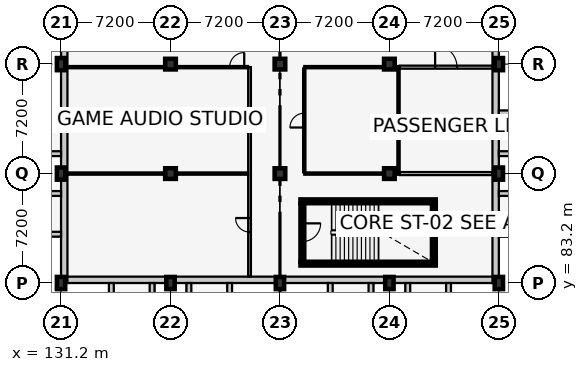
"""IFC4 building model, lengths in metres.
Left out: names, types, materials, properties, quantities, classifications, styles, units other than length and angle.
Written with IfcOpenShell. Run it as: python <this file> out.ifc"""

import sys

from ifc_helpers import new_model, si_unit, direction, frame, frame_2d, origin, origin_2d, place, context, subcontext, project, spatial, rectangle, extrude, element, fill, save


model = new_model("IFC4")
c1 = context("Model", 3, precision=1e-05, world=origin(), true_north=direction((0.0, 1.0)))
c2 = subcontext(c1, "Body", "Model", "MODEL_VIEW")
j1 = project(units=[si_unit("LENGTHUNIT", "METRE"), si_unit("PLANEANGLEUNIT", "RADIAN")], contexts=[c1])
p1 = place(None, origin())
s1 = spatial("IfcSite", under=j1, at=p1, CompositionType="ELEMENT")
p2 = place(p1, origin())
s2 = spatial("IfcBuilding", under=s1, at=p2, CompositionType="ELEMENT")
p3 = place(p2, frame((0.0, 0.0, 18.0)))
s3 = spatial("IfcBuildingStorey", under=s2, at=p3, CompositionType="ELEMENT", Elevation=18.0)
for number, where, z_axis, x_axis in (
    (1, (131.2, 83.2, 0.0), (0.0, 0.0, 1.0), (1.0, 0.0, 0.0)),
    (2, (131.2, 90.4, 0.0), (0.0, 0.0, 1.0), (1.0, 0.0, 0.0)),
    (3, (131.2, 97.6, 0.0), (0.0, 0.0, 1.0), (1.0, 0.0, 0.0)),
    (4, (138.4, 83.2, 0.0), (0.0, 0.0, 1.0), (1.0, 0.0, 0.0)),
):
    element("IfcColumn", number, at=place(p3, frame(where, z_axis=z_axis, x_axis=x_axis)), inside=s3, PredefinedType="COLUMN", context=c2, shape_type="SweptSolid", body=[
        extrude(rectangle(XDim=0.55, YDim=0.8, at=origin_2d()), origin(), (0.0, 0.0, 1.0), 3.9),
    ])
for number, where, z_axis, x_axis in (
    (5, (138.4, 90.4, 0.0), (0.0, 0.0, 1.0), (1.0, 0.0, 0.0)),
    (6, (138.4, 97.6, 0.0), (0.0, 0.0, 1.0), (1.0, 0.0, 0.0)),
):
    element("IfcColumn", number, at=place(p3, frame(where, z_axis=z_axis, x_axis=x_axis)), inside=s3, PredefinedType="COLUMN", context=c2, shape_type="SweptSolid", body=[
        extrude(rectangle(XDim=0.7, YDim=0.7, at=origin_2d()), origin(), (0.0, 0.0, 1.0), 3.9),
    ])
p4 = place(p3, frame((145.6, 83.2, 0.0), z_axis=(0.0, 0.0, 1.0), x_axis=(1.0, 0.0, 0.0)))
e7 = element("IfcColumn", 7, at=p4, inside=s3, PredefinedType="COLUMN", context=c2, shape_type="SweptSolid", body=[
    extrude(rectangle(XDim=0.55, YDim=0.8, at=origin_2d()), origin(), (0.0, 0.0, 1.0), 3.9),
])
for number, where, z_axis, x_axis in (
    (8, (145.6, 90.4, 0.0), (0.0, 0.0, 1.0), (1.0, 0.0, 0.0)),
    (9, (145.6, 97.6, 0.0), (0.0, 0.0, 1.0), (1.0, 0.0, 0.0)),
):
    element("IfcColumn", number, at=place(p3, frame(where, z_axis=z_axis, x_axis=x_axis)), inside=s3, PredefinedType="COLUMN", context=c2, shape_type="SweptSolid", body=[
        extrude(rectangle(XDim=0.7, YDim=0.7, at=origin_2d()), origin(), (0.0, 0.0, 1.0), 3.9),
    ])
p5 = place(p3, frame((152.8, 83.2, 0.0), z_axis=(0.0, 0.0, 1.0), x_axis=(1.0, 0.0, 0.0)))
e10 = element("IfcColumn", 10, at=p5, inside=s3, PredefinedType="COLUMN", context=c2, shape_type="SweptSolid", body=[
    extrude(rectangle(XDim=0.55, YDim=0.8, at=origin_2d()), origin(), (0.0, 0.0, 1.0), 3.9),
])
for number, where, z_axis, x_axis in (
    (11, (152.8, 90.4, 0.0), (0.0, 0.0, 1.0), (1.0, 0.0, 0.0)),
    (12, (152.8, 97.6, 0.0), (0.0, 0.0, 1.0), (1.0, 0.0, 0.0)),
):
    element("IfcColumn", number, at=place(p3, frame(where, z_axis=z_axis, x_axis=x_axis)), inside=s3, PredefinedType="COLUMN", context=c2, shape_type="SweptSolid", body=[
        extrude(rectangle(XDim=0.7, YDim=0.7, at=origin_2d()), origin(), (0.0, 0.0, 1.0), 3.9),
    ])
for number, where, z_axis, x_axis in (
    (13, (160.0, 83.2, 0.0), (0.0, 0.0, 1.0), (1.0, 0.0, 0.0)),
    (14, (160.0, 90.4, 0.0), (0.0, 0.0, 1.0), (1.0, 0.0, 0.0)),
    (15, (160.0, 97.6, 0.0), (0.0, 0.0, 1.0), (1.0, 0.0, 0.0)),
):
    element("IfcColumn", number, at=place(p3, frame(where, z_axis=z_axis, x_axis=x_axis)), inside=s3, PredefinedType="COLUMN", context=c2, shape_type="SweptSolid", body=[
        extrude(rectangle(XDim=0.55, YDim=0.8, at=origin_2d()), origin(), (0.0, 0.0, 1.0), 3.9),
    ])
p6 = place(p3, frame((160.0, 83.41, 0.0), z_axis=(0.0, 0.0, 1.0), x_axis=(-1.0, 0.0, 0.0)))
e16 = element("IfcWall", 16, at=p6, inside=s3, PredefinedType="SOLIDWALL", context=c2, shape_type="SweptSolid", body=[
    extrude(rectangle(XDim=28.8, YDim=0.42, at=frame_2d((14.4, 0.0))), origin(), (0.0, 0.0, 1.0), 2.955),
])
p7 = place(p3, frame((134.51, 83.2, 0.0), z_axis=(0.0, 0.0, 1.0), x_axis=(0.0, -1.0, 0.0)))
e17 = element("IfcWall", 17, at=p7, inside=s3, PredefinedType="SOLIDWALL", context=c2, shape_type="SweptSolid", body=[
    extrude(rectangle(XDim=1.35, YDim=0.32, at=frame_2d((0.675, 0.0))), origin(), (0.0, 0.0, 1.0), 3.64),
])
for number, where, z_axis, x_axis in (
    (18, (137.19, 83.2, 0.0), (0.0, 0.0, 1.0), (0.0, -1.0, 0.0)),
    (19, (139.61, 83.2, 0.0), (0.0, 0.0, 1.0), (0.0, -1.0, 0.0)),
):
    element("IfcWall", number, at=place(p3, frame(where, z_axis=z_axis, x_axis=x_axis)), inside=s3, PredefinedType="SOLIDWALL", context=c2, shape_type="SweptSolid", body=[
        extrude(rectangle(XDim=1.793, YDim=0.32, at=frame_2d((0.896, 0.0))), origin(), (0.0, 0.0, 1.0), 3.64),
    ])
for number, where, z_axis, x_axis in (
    (20, (142.29, 83.2, 0.0), (0.0, 0.0, 1.0), (0.0, -1.0, 0.0)),
    (21, (148.91, 83.2, 0.0), (0.0, 0.0, 1.0), (0.0, -1.0, 0.0)),
):
    element("IfcWall", number, at=place(p3, frame(where, z_axis=z_axis, x_axis=x_axis)), inside=s3, PredefinedType="SOLIDWALL", context=c2, shape_type="SweptSolid", body=[
        extrude(rectangle(XDim=1.35, YDim=0.32, at=frame_2d((0.675, 0.0))), origin(), (0.0, 0.0, 1.0), 3.64),
    ])
for number, where, z_axis, x_axis in (
    (22, (151.59, 83.2, 0.0), (0.0, 0.0, 1.0), (0.0, -1.0, 0.0)),
    (23, (154.01, 83.2, 0.0), (0.0, 0.0, 1.0), (0.0, -1.0, 0.0)),
):
    element("IfcWall", number, at=place(p3, frame(where, z_axis=z_axis, x_axis=x_axis)), inside=s3, PredefinedType="SOLIDWALL", context=c2, shape_type="SweptSolid", body=[
        extrude(rectangle(XDim=1.793, YDim=0.32, at=frame_2d((0.896, 0.0))), origin(), (0.0, 0.0, 1.0), 3.64),
    ])
p8 = place(p3, frame((156.69, 83.2, 0.0), z_axis=(0.0, 0.0, 1.0), x_axis=(0.0, -1.0, 0.0)))
e24 = element("IfcWall", 24, at=p8, inside=s3, PredefinedType="SOLIDWALL", context=c2, shape_type="SweptSolid", body=[
    extrude(rectangle(XDim=1.35, YDim=0.32, at=frame_2d((0.675, 0.0))), origin(), (0.0, 0.0, 1.0), 3.64),
])
p9 = place(p3, frame((159.79, 112.0, 0.0), z_axis=(0.0, 0.0, 1.0), x_axis=(0.0, -1.0, 0.0)))
e25 = element("IfcWall", 25, at=p9, inside=s3, PredefinedType="SOLIDWALL", context=c2, shape_type="SweptSolid", body=[
    extrude(rectangle(XDim=28.8, YDim=0.42, at=frame_2d((14.4, 0.0))), origin(), (0.0, 0.0, 1.0), 3.055),
])
p10 = place(p3, frame((160.0, 86.41, 0.0), z_axis=(0.0, 0.0, 1.0), x_axis=(1.0, 0.0, 0.0)))
e26 = element("IfcWall", 26, at=p10, inside=s3, PredefinedType="SOLIDWALL", context=c2, shape_type="SweptSolid", body=[
    extrude(rectangle(XDim=1.793, YDim=0.32, at=frame_2d((0.896, 0.0))), origin(), (0.0, 0.0, 1.0), 3.64),
])
for number, where, z_axis, x_axis in (
    (27, (160.0, 89.09, 0.0), (0.0, 0.0, 1.0), (1.0, 0.0, 0.0)),
    (28, (160.0, 91.71, 0.0), (0.0, 0.0, 1.0), (1.0, 0.0, 0.0)),
):
    element("IfcWall", number, at=place(p3, frame(where, z_axis=z_axis, x_axis=x_axis)), inside=s3, PredefinedType="SOLIDWALL", context=c2, shape_type="SweptSolid", body=[
        extrude(rectangle(XDim=1.35, YDim=0.32, at=frame_2d((0.675, 0.0))), origin(), (0.0, 0.0, 1.0), 3.64),
    ])
p11 = place(p3, frame((160.0, 94.39, 0.0), z_axis=(0.0, 0.0, 1.0), x_axis=(1.0, 0.0, 0.0)))
e29 = element("IfcWall", 29, at=p11, inside=s3, PredefinedType="SOLIDWALL", context=c2, shape_type="SweptSolid", body=[
    extrude(rectangle(XDim=1.793, YDim=0.32, at=frame_2d((0.896, 0.0))), origin(), (0.0, 0.0, 1.0), 3.64),
])
p12 = place(p3, frame((131.41, 83.2, 0.0), z_axis=(0.0, 0.0, 1.0), x_axis=(0.0, 1.0, 0.0)))
e30 = element("IfcWall", 30, at=p12, inside=s3, PredefinedType="SOLIDWALL", context=c2, shape_type="SweptSolid", body=[
    extrude(rectangle(XDim=28.8, YDim=0.42, at=frame_2d((14.4, 0.0))), origin(), (0.0, 0.0, 1.0), 3.055),
])
p13 = place(p3, frame((131.2, 86.41, 0.0), z_axis=(0.0, 0.0, 1.0), x_axis=(-1.0, 0.0, 0.0)))
e31 = element("IfcWall", 31, at=p13, inside=s3, PredefinedType="SOLIDWALL", context=c2, shape_type="SweptSolid", body=[
    extrude(rectangle(XDim=1.35, YDim=0.32, at=frame_2d((0.675, 0.0))), origin(), (0.0, 0.0, 1.0), 3.64),
])
for number, where, z_axis, x_axis in (
    (32, (131.2, 89.09, 0.0), (0.0, 0.0, 1.0), (-1.0, 0.0, 0.0)),
    (33, (131.2, 91.71, 0.0), (0.0, 0.0, 1.0), (-1.0, 0.0, 0.0)),
):
    element("IfcWall", number, at=place(p3, frame(where, z_axis=z_axis, x_axis=x_axis)), inside=s3, PredefinedType="SOLIDWALL", context=c2, shape_type="SweptSolid", body=[
        extrude(rectangle(XDim=1.793, YDim=0.32, at=frame_2d((0.896, 0.0))), origin(), (0.0, 0.0, 1.0), 3.64),
    ])
p14 = place(p3, frame((131.2, 94.39, 0.0), z_axis=(0.0, 0.0, 1.0), x_axis=(-1.0, 0.0, 0.0)))
e34 = element("IfcWall", 34, at=p14, inside=s3, PredefinedType="SOLIDWALL", context=c2, shape_type="SweptSolid", body=[
    extrude(rectangle(XDim=1.35, YDim=0.32, at=frame_2d((0.675, 0.0))), origin(), (0.0, 0.0, 1.0), 3.64),
])
for number, where, z_axis, x_axis in (
    (35, (146.95, 84.475, 0.0), (0.0, 0.0, 1.0), (1.0, 0.0, 0.0)),
    (36, (155.85, 88.575, 0.0), (0.0, 0.0, 1.0), (-1.0, 0.0, 0.0)),
):
    element("IfcWall", number, at=place(p3, frame(where, z_axis=z_axis, x_axis=x_axis)), inside=s3, PredefinedType="SHEAR", context=c2, shape_type="SweptSolid", body=[
        extrude(rectangle(XDim=8.9, YDim=0.25, at=frame_2d((4.45, 0.0))), origin(), (0.0, 0.0, 1.0), 3.66),
    ])
p15 = place(p3, frame((147.075, 88.45, 0.0), z_axis=(0.0, 0.0, 1.0), x_axis=(0.0, -1.0, 0.0)))
e37 = element("IfcWall", 37, at=p15, inside=s3, PredefinedType="SHEAR", context=c2, shape_type="SweptSolid", body=[
    extrude(rectangle(XDim=3.85, YDim=0.25, at=frame_2d((1.925, 0.0))), origin(), (0.0, 0.0, 1.0), 3.66),
])
p16 = place(p15, frame((1.325, 0.0, 0.0)))
e38 = element("IfcOpeningElement", 38, at=p16, cuts=e37, PredefinedType="OPENING", context=c2, shape_type="SweptSolid", body=[
    extrude(rectangle(XDim=1.2, YDim=2.15, at=frame_2d((0.6, 1.075))), frame((0.0, 0.137, 0.0), z_axis=(0.0, -1.0, 0.0), x_axis=(1.0, 0.0, 0.0)), (0.0, 0.0, 1.0), 0.274),
])
p17 = place(p3, frame((155.725, 84.6, 0.0), z_axis=(0.0, 0.0, 1.0), x_axis=(0.0, 1.0, 0.0)))
e39 = element("IfcWall", 39, at=p17, inside=s3, PredefinedType="SHEAR", context=c2, shape_type="SweptSolid", body=[
    extrude(rectangle(XDim=3.85, YDim=0.25, at=frame_2d((1.925, 0.0))), origin(), (0.0, 0.0, 1.0), 3.66),
])
p18 = place(p3, frame((143.6, 83.63, 0.0), z_axis=(0.0, 0.0, 1.0), x_axis=(0.0, 1.0, 0.0)))
e40 = element("IfcWall", 40, at=p18, inside=s3, PredefinedType="PARTITIONING", context=c2, shape_type="SweptSolid", body=[
    extrude(rectangle(XDim=13.77, YDim=0.18, at=frame_2d((6.885, 0.0))), origin(), (0.0, 0.0, 1.0), 3.66),
])
p19 = place(p18, frame((2.925, 0.0, 0.0)))
e41 = element("IfcOpeningElement", 41, at=p19, cuts=e40, PredefinedType="OPENING", context=c2, shape_type="SweptSolid", body=[
    extrude(rectangle(XDim=0.92, YDim=2.08, at=frame_2d((0.46, 1.04))), frame((0.0, 0.102, 0.0), z_axis=(0.0, -1.0, 0.0), x_axis=(1.0, 0.0, 0.0)), (0.0, 0.0, 1.0), 0.204),
])
p20 = place(p3, frame((131.63, 90.4, 0.0), z_axis=(0.0, 0.0, 1.0), x_axis=(1.0, 0.0, 0.0)))
e42 = element("IfcWall", 42, at=p20, inside=s3, PredefinedType="PARTITIONING", context=c2, shape_type="SweptSolid", body=[
    extrude(rectangle(XDim=11.87, YDim=0.15, at=frame_2d((5.935, 0.0))), origin(), (0.0, 0.0, 1.0), 2.835),
])
p21 = place(p3, frame((131.63, 97.4, 0.0), z_axis=(0.0, 0.0, 1.0), x_axis=(1.0, 0.0, 0.0)))
e43 = element("IfcWall", 43, at=p21, inside=s3, PredefinedType="PARTITIONING", context=c2, shape_type="SweptSolid", body=[
    extrude(rectangle(XDim=11.87, YDim=0.15, at=frame_2d((5.935, 0.0))), origin(), (0.0, 0.0, 1.0), 2.835),
])
p22 = place(p21, frame((10.66, 0.0, 0.0)))
e44 = element("IfcOpeningElement", 44, at=p22, cuts=e43, PredefinedType="OPENING", context=c2, shape_type="SweptSolid", body=[
    extrude(rectangle(XDim=0.96, YDim=2.1, at=frame_2d((0.48, 1.05))), frame((0.0, 0.087, 0.0), z_axis=(0.0, -1.0, 0.0), x_axis=(1.0, 0.0, 0.0)), (0.0, 0.0, 1.0), 0.174),
])
for number, where, z_axis, x_axis in (
    (45, (147.2, 90.4, 0.0), (0.0, 0.0, 1.0), (1.0, 0.0, 0.0)),
    (46, (147.2, 97.4, 0.0), (0.0, 0.0, 1.0), (1.0, 0.0, 0.0)),
):
    element("IfcWall", number, at=place(p3, frame(where, z_axis=z_axis, x_axis=x_axis)), inside=s3, PredefinedType="PARTITIONING", context=c2, shape_type="SweptSolid", body=[
        extrude(rectangle(XDim=6.2, YDim=0.15, at=frame_2d((3.1, 0.0))), origin(), (0.0, 0.0, 1.0), 2.985),
    ])
p23 = place(p3, frame((147.2, 90.485, 0.0), z_axis=(0.0, 0.0, 1.0), x_axis=(0.0, 1.0, 0.0)))
e47 = element("IfcWall", 47, at=p23, inside=s3, PredefinedType="PARTITIONING", context=c2, shape_type="SweptSolid", body=[
    extrude(rectangle(XDim=6.83, YDim=0.15, at=frame_2d((3.415, 0.0))), origin(), (0.0, 0.0, 1.0), 3.66),
])
p24 = place(p23, frame((2.945, 0.0, 0.0)))
e48 = element("IfcOpeningElement", 48, at=p24, cuts=e47, PredefinedType="OPENING", context=c2, shape_type="SweptSolid", body=[
    extrude(rectangle(XDim=0.94, YDim=2.1, at=frame_2d((0.47, 1.05))), frame((0.0, 0.087, 0.0), z_axis=(0.0, -1.0, 0.0), x_axis=(1.0, 0.0, 0.0)), (0.0, 0.0, 1.0), 0.174),
])
p25 = place(p3, frame((153.4, 90.485, 0.0), z_axis=(0.0, 0.0, 1.0), x_axis=(0.0, 1.0, 0.0)))
e49 = element("IfcWall", 49, at=p25, inside=s3, PredefinedType="PARTITIONING", context=c2, shape_type="SweptSolid", body=[
    extrude(rectangle(XDim=6.83, YDim=0.15, at=frame_2d((3.415, 0.0))), origin(), (0.0, 0.0, 1.0), 3.66),
])
p26 = place(p3, frame((153.485, 90.4, 0.0), z_axis=(0.0, 0.0, 1.0), x_axis=(1.0, 0.0, 0.0)))
e50 = element("IfcWall", 50, at=p26, inside=s3, PredefinedType="PARTITIONING", context=c2, shape_type="SweptSolid", body=[
    extrude(rectangle(XDim=6.085, YDim=0.2, at=frame_2d((3.042, 0.0))), origin(), (0.0, 0.0, 1.0), 2.985),
])
p27 = place(p3, frame((153.485, 97.4, 0.0), z_axis=(0.0, 0.0, 1.0), x_axis=(1.0, 0.0, 0.0)))
e51 = element("IfcWall", 51, at=p27, inside=s3, PredefinedType="PARTITIONING", context=c2, shape_type="SweptSolid", body=[
    extrude(rectangle(XDim=6.085, YDim=0.2, at=frame_2d((3.042, 0.0))), origin(), (0.0, 0.0, 1.0), 2.985),
])
p28 = place(p27, frame((2.323, 0.0, 0.0)))
e52 = element("IfcOpeningElement", 52, at=p28, cuts=e51, PredefinedType="OPENING", context=c2, shape_type="SweptSolid", body=[
    extrude(rectangle(XDim=1.44, YDim=2.2, at=frame_2d((0.72, 1.1))), frame((0.0, 0.112, 0.0), z_axis=(0.0, -1.0, 0.0), x_axis=(1.0, 0.0, 0.0)), (0.0, 0.0, 1.0), 0.224),
])
p29 = place(p16, origin())
e53 = element("IfcDoor", 53, at=p29, inside=s3, OperationType="SINGLE_SWING_LEFT", PredefinedType="DOOR", context=c2, shape_type="SweptSolid", body=[
    extrude(rectangle(XDim=1.2, YDim=2.15, at=frame_2d((0.6, 1.075))), frame((0.0, 0.025, 0.0), z_axis=(0.0, -1.0, 0.0), x_axis=(1.0, 0.0, 0.0)), (0.0, 0.0, 1.0), 0.05),
])
fill(e38, e53)
p30 = place(p22, origin())
e54 = element("IfcDoor", 54, at=p30, inside=s3, OperationType="SINGLE_SWING_RIGHT", PredefinedType="DOOR", context=c2, shape_type="SweptSolid", body=[
    extrude(rectangle(XDim=0.96, YDim=2.1, at=frame_2d((0.48, 1.05))), frame((0.0, 0.025, 0.0), z_axis=(0.0, -1.0, 0.0), x_axis=(1.0, 0.0, 0.0)), (0.0, 0.0, 1.0), 0.05),
])
fill(e44, e54)
p31 = place(p24, origin())
e55 = element("IfcDoor", 55, at=p31, inside=s3, OperationType="SINGLE_SWING_LEFT", PredefinedType="DOOR", context=c2, shape_type="SweptSolid", body=[
    extrude(rectangle(XDim=0.94, YDim=2.1, at=frame_2d((0.47, 1.05))), frame((0.0, 0.025, 0.0), z_axis=(0.0, -1.0, 0.0), x_axis=(1.0, 0.0, 0.0)), (0.0, 0.0, 1.0), 0.05),
])
fill(e48, e55)
p32 = place(p19, origin())
e56 = element("IfcDoor", 56, at=p32, inside=s3, OperationType="SINGLE_SWING_RIGHT", PredefinedType="DOOR", context=c2, shape_type="SweptSolid", body=[
    extrude(rectangle(XDim=0.92, YDim=2.08, at=frame_2d((0.46, 1.04))), frame((0.0, 0.025, 0.0), z_axis=(0.0, -1.0, 0.0), x_axis=(1.0, 0.0, 0.0)), (0.0, 0.0, 1.0), 0.05),
])
fill(e41, e56)
p33 = place(p28, origin())
e57 = element("IfcDoor", 57, at=p33, inside=s3, OperationType="SINGLE_SWING_LEFT", PredefinedType="DOOR", context=c2, shape_type="SweptSolid", body=[
    extrude(rectangle(XDim=1.44, YDim=2.2, at=frame_2d((0.72, 1.1))), frame((0.0, 0.025, 0.0), z_axis=(0.0, -1.0, 0.0), x_axis=(1.0, 0.0, 0.0)), (0.0, 0.0, 1.0), 0.05),
])
fill(e52, e57)
save(model, sys.argv[1])
